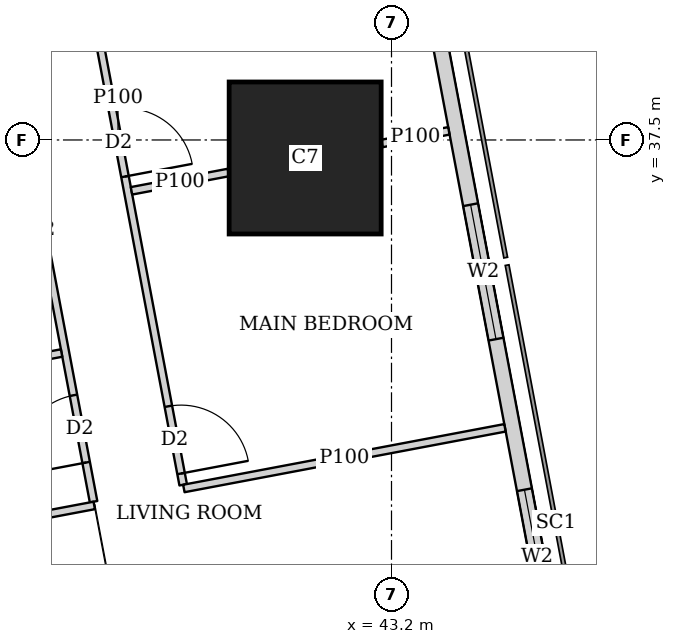
"""IFC4 building model, lengths in metres.
Left out: names, types, materials, properties, quantities, classifications, styles, units other than length and angle.
Written with IfcOpenShell. Run it as: python <this file> out.ifc"""

import sys

from ifc_helpers import new_model, si_unit, direction, frame, frame_2d, origin, origin_2d, place, context, subcontext, project, spatial, rectangle, extrude, element, fill, save


model = new_model("IFC4")
c1 = context("Model", 3, precision=1e-05, world=origin(), true_north=direction((0.0, 1.0)))
c2 = subcontext(c1, "Body", "Model", "MODEL_VIEW")
j1 = project(units=[si_unit("LENGTHUNIT", "METRE"), si_unit("PLANEANGLEUNIT", "RADIAN")], contexts=[c1])
p1 = place(None, origin())
s1 = spatial("IfcSite", under=j1, at=p1, CompositionType="ELEMENT")
p2 = place(p1, origin())
s2 = spatial("IfcBuilding", under=s1, at=p2, CompositionType="ELEMENT")
p3 = place(p2, frame((0.0, 0.0, 274.1)))
s3 = spatial("IfcBuildingStorey", under=s2, at=p3, CompositionType="ELEMENT", Elevation=274.1)
p4 = place(p3, frame((42.064, 37.263, 0.0), z_axis=(0.0, 0.0, 1.0), x_axis=(1.0, 0.0, 0.0)))
e1 = element("IfcColumn", 1, at=p4, inside=s3, PredefinedType="COLUMN", context=c2, shape_type="SweptSolid", body=[
    extrude(rectangle(XDim=2.0, YDim=2.0, at=origin_2d()), origin(), (0.0, 0.0, 1.0), 3.75),
])
p5 = place(p3, frame((49.684, 7.832, 0.0), z_axis=(0.0, 0.0, 1.0), x_axis=(-0.185616669694, 0.982622232565, 0.0)))
e2 = element("IfcWall", 2, at=p5, inside=s3, PredefinedType="SOLIDWALL", context=c2, shape_type="SweptSolid", body=[
    extrude(rectangle(XDim=36.0, YDim=0.2, at=frame_2d((18.0, 0.0))), origin(), (0.0, 0.0, 1.0), 3.5),
])
p6 = place(p5, frame((2.518, 0.0, 0.9)))
e3 = element("IfcOpeningElement", 3, at=p6, cuts=e2, PredefinedType="OPENING", context=c2, shape_type="SweptSolid", body=[
    extrude(rectangle(XDim=2.4, YDim=1.5, at=frame_2d((1.2, 0.75))), frame((0.0, 0.11, 0.0), z_axis=(0.0, -1.0, 0.0), x_axis=(1.0, 0.0, 0.0)), (0.0, 0.0, 1.0), 0.22),
])
p7 = place(p5, frame((8.444, 0.0, 0.9)))
e4 = element("IfcOpeningElement", 4, at=p7, cuts=e2, PredefinedType="OPENING", context=c2, shape_type="SweptSolid", body=[
    extrude(rectangle(XDim=1.8, YDim=1.5, at=frame_2d((0.9, 0.75))), frame((0.0, 0.11, 0.0), z_axis=(0.0, -1.0, 0.0), x_axis=(1.0, 0.0, 0.0)), (0.0, 0.0, 1.0), 0.22),
])
p8 = place(p5, frame((12.261, 0.0, 0.9)))
e5 = element("IfcOpeningElement", 5, at=p8, cuts=e2, PredefinedType="OPENING", context=c2, shape_type="SweptSolid", body=[
    extrude(rectangle(XDim=1.8, YDim=1.5, at=frame_2d((0.9, 0.75))), frame((0.0, 0.11, 0.0), z_axis=(0.0, -1.0, 0.0), x_axis=(1.0, 0.0, 0.0)), (0.0, 0.0, 1.0), 0.22),
])
p9 = place(p5, frame((16.078, 0.0, 0.9)))
e6 = element("IfcOpeningElement", 6, at=p9, cuts=e2, PredefinedType="OPENING", context=c2, shape_type="SweptSolid", body=[
    extrude(rectangle(XDim=1.8, YDim=1.5, at=frame_2d((0.9, 0.75))), frame((0.0, 0.11, 0.0), z_axis=(0.0, -1.0, 0.0), x_axis=(1.0, 0.0, 0.0)), (0.0, 0.0, 1.0), 0.22),
])
p10 = place(p5, frame((19.894, 0.0, 0.9)))
e7 = element("IfcOpeningElement", 7, at=p10, cuts=e2, PredefinedType="OPENING", context=c2, shape_type="SweptSolid", body=[
    extrude(rectangle(XDim=1.8, YDim=1.5, at=frame_2d((0.9, 0.75))), frame((0.0, 0.11, 0.0), z_axis=(0.0, -1.0, 0.0), x_axis=(1.0, 0.0, 0.0)), (0.0, 0.0, 1.0), 0.22),
])
p11 = place(p5, frame((23.71, 0.0, 0.9)))
e8 = element("IfcOpeningElement", 8, at=p11, cuts=e2, PredefinedType="OPENING", context=c2, shape_type="SweptSolid", body=[
    extrude(rectangle(XDim=1.8, YDim=1.5, at=frame_2d((0.9, 0.75))), frame((0.0, 0.11, 0.0), z_axis=(0.0, -1.0, 0.0), x_axis=(1.0, 0.0, 0.0)), (0.0, 0.0, 1.0), 0.22),
])
p12 = place(p5, frame((27.526, 0.0, 0.9)))
e9 = element("IfcOpeningElement", 9, at=p12, cuts=e2, PredefinedType="OPENING", context=c2, shape_type="SweptSolid", body=[
    extrude(rectangle(XDim=1.8, YDim=1.5, at=frame_2d((0.9, 0.75))), frame((0.0, 0.11, 0.0), z_axis=(0.0, -1.0, 0.0), x_axis=(1.0, 0.0, 0.0)), (0.0, 0.0, 1.0), 0.22),
])
p13 = place(p5, frame((32.046, 0.0, 0.9)))
e10 = element("IfcOpeningElement", 10, at=p13, cuts=e2, PredefinedType="OPENING", context=c2, shape_type="SweptSolid", body=[
    extrude(rectangle(XDim=1.8, YDim=1.5, at=frame_2d((0.9, 0.75))), frame((0.0, 0.11, 0.0), z_axis=(0.0, -1.0, 0.0), x_axis=(1.0, 0.0, 0.0)), (0.0, 0.0, 1.0), 0.22),
])
p14 = place(p3, frame((33.781, 42.186, 0.0), z_axis=(0.0, 0.0, 1.0), x_axis=(0.185593518645, -0.9826266055, 0.0)))
e11 = element("IfcWall", 11, at=p14, inside=s3, PredefinedType="SOLIDWALL", context=c2, shape_type="SweptSolid", body=[
    extrude(rectangle(XDim=35.961, YDim=0.15, at=frame_2d((17.98, 0.0))), origin(), (0.0, 0.0, 1.0), 2.5),
])
p15 = place(p14, frame((11.76, 0.0, 0.0)))
e12 = element("IfcOpeningElement", 12, at=p15, cuts=e11, PredefinedType="OPENING", context=c2, shape_type="SweptSolid", body=[
    extrude(rectangle(XDim=1.0, YDim=2.1, at=frame_2d((0.5, 1.05))), frame((0.0, 0.085, 0.0), z_axis=(0.0, -1.0, 0.0), x_axis=(1.0, 0.0, 0.0)), (0.0, 0.0, 1.0), 0.17),
])
p16 = place(p14, frame((15.576, 0.0, 0.0)))
e13 = element("IfcOpeningElement", 13, at=p16, cuts=e11, PredefinedType="OPENING", context=c2, shape_type="SweptSolid", body=[
    extrude(rectangle(XDim=1.0, YDim=2.1, at=frame_2d((0.5, 1.05))), frame((0.0, 0.085, 0.0), z_axis=(0.0, -1.0, 0.0), x_axis=(1.0, 0.0, 0.0)), (0.0, 0.0, 1.0), 0.17),
])
p17 = place(p14, frame((30.502, 0.0, 0.0)))
e14 = element("IfcOpeningElement", 14, at=p17, cuts=e11, PredefinedType="OPENING", context=c2, shape_type="SweptSolid", body=[
    extrude(rectangle(XDim=1.0, YDim=2.1, at=frame_2d((0.5, 1.05))), frame((0.0, 0.085, 0.0), z_axis=(0.0, -1.0, 0.0), x_axis=(1.0, 0.0, 0.0)), (0.0, 0.0, 1.0), 0.17),
])
p18 = place(p3, frame((38.744, 42.045, 0.0), z_axis=(0.0, 0.0, 1.0), x_axis=(0.185588352162, -0.982627581305, 0.0)))
e15 = element("IfcWall", 15, at=p18, inside=s3, PredefinedType="PARTITIONING", context=c2, shape_type="SweptSolid", body=[
    extrude(rectangle(XDim=9.241, YDim=0.1, at=frame_2d((4.621, 0.0))), origin(), (0.0, 0.0, 1.0), 3.5),
])
p19 = place(p18, frame((8.191, 0.0, 0.0)))
e16 = element("IfcOpeningElement", 16, at=p19, cuts=e15, PredefinedType="OPENING", context=c2, shape_type="SweptSolid", body=[
    extrude(rectangle(XDim=0.9, YDim=2.1, at=frame_2d((0.45, 1.05))), frame((0.0, 0.06, 0.0), z_axis=(0.0, -1.0, 0.0), x_axis=(1.0, 0.0, 0.0)), (0.0, 0.0, 1.0), 0.12),
])
p20 = place(p18, frame((4.215, 0.0, 0.0)))
e17 = element("IfcOpeningElement", 17, at=p20, cuts=e15, PredefinedType="OPENING", context=c2, shape_type="SweptSolid", body=[
    extrude(rectangle(XDim=0.9, YDim=2.1, at=frame_2d((0.45, 1.05))), frame((0.0, 0.06, 0.0), z_axis=(0.0, -1.0, 0.0), x_axis=(1.0, 0.0, 0.0)), (0.0, 0.0, 1.0), 0.12),
])
p21 = place(p3, frame((37.51, 42.109, 0.0), z_axis=(0.0, 0.0, 1.0), x_axis=(0.185659798122, -0.982614084654, 0.0)))
e18 = element("IfcWall", 18, at=p21, inside=s3, PredefinedType="PARTITIONING", context=c2, shape_type="SweptSolid", body=[
    extrude(rectangle(XDim=9.534, YDim=0.1, at=frame_2d((4.767, 0.0))), origin(), (0.0, 0.0, 1.0), 3.5),
])
p22 = place(p21, frame((8.109, 0.0, 0.0)))
e19 = element("IfcOpeningElement", 19, at=p22, cuts=e18, PredefinedType="OPENING", context=c2, shape_type="SweptSolid", body=[
    extrude(rectangle(XDim=0.9, YDim=2.1, at=frame_2d((0.45, 1.05))), frame((0.0, 0.06, 0.0), z_axis=(0.0, -1.0, 0.0), x_axis=(1.0, 0.0, 0.0)), (0.0, 0.0, 1.0), 0.12),
])
p23 = place(p21, frame((2.65, 0.0, 0.0)))
e20 = element("IfcOpeningElement", 20, at=p23, cuts=e18, PredefinedType="OPENING", context=c2, shape_type="SweptSolid", body=[
    extrude(rectangle(XDim=0.9, YDim=2.1, at=frame_2d((0.45, 1.05))), frame((0.0, 0.06, 0.0), z_axis=(0.0, -1.0, 0.0), x_axis=(1.0, 0.0, 0.0)), (0.0, 0.0, 1.0), 0.12),
])
p24 = place(p21, frame((5.44, 0.0, 0.0)))
e21 = element("IfcOpeningElement", 21, at=p24, cuts=e18, PredefinedType="OPENING", context=c2, shape_type="SweptSolid", body=[
    extrude(rectangle(XDim=0.9, YDim=2.1, at=frame_2d((0.45, 1.05))), frame((0.0, 0.06, 0.0), z_axis=(0.0, -1.0, 0.0), x_axis=(1.0, 0.0, 0.0)), (0.0, 0.0, 1.0), 0.12),
])
p25 = place(p3, frame((43.955, 37.62, 0.0), z_axis=(0.0, 0.0, 1.0), x_axis=(-0.982708424405, -0.18515980288, 0.0)))
e22 = element("IfcWall", 22, at=p25, inside=s3, PredefinedType="PARTITIONING", context=c2, shape_type="SweptSolid", body=[
    extrude(rectangle(XDim=0.897, YDim=0.1, at=frame_2d((0.448, 0.0))), origin(), (0.0, 0.0, 1.0), 3.5),
])
p26 = place(p3, frame((41.054, 37.072, 0.0), z_axis=(0.0, 0.0, 1.0), x_axis=(-0.982602741717, -0.185719821156, 0.0)))
e23 = element("IfcWall", 23, at=p26, inside=s3, PredefinedType="PARTITIONING", context=c2, shape_type="SweptSolid", body=[
    extrude(rectangle(XDim=1.297, YDim=0.1, at=frame_2d((0.649, 0.0))), origin(), (0.0, 0.0, 1.0), 3.5),
])
p27 = place(p3, frame((44.693, 33.713, 0.0), z_axis=(0.0, 0.0, 1.0), x_axis=(-0.982633535512, -0.185556823879, 0.0)))
e24 = element("IfcWall", 24, at=p27, inside=s3, PredefinedType="PARTITIONING", context=c2, shape_type="SweptSolid", body=[
    extrude(rectangle(XDim=4.3, YDim=0.1, at=frame_2d((2.15, 0.0))), origin(), (0.0, 0.0, 1.0), 2.5),
])
p28 = place(p3, frame((39.289, 32.692, 0.0), z_axis=(0.0, 0.0, 1.0), x_axis=(-0.982662827464, -0.185401638399, 0.0)))
e25 = element("IfcWall", 25, at=p28, inside=s3, PredefinedType="PARTITIONING", context=c2, shape_type="SweptSolid", body=[
    extrude(rectangle(XDim=3.575, YDim=0.1, at=frame_2d((1.788, 0.0))), origin(), (0.0, 0.0, 1.0), 3.5),
])
p29 = place(p3, frame((38.859, 34.697, 0.0), z_axis=(0.0, 0.0, 1.0), x_axis=(-0.982626628545, -0.185593396635, 0.0)))
e26 = element("IfcWall", 26, at=p29, inside=s3, PredefinedType="PARTITIONING", context=c2, shape_type="SweptSolid", body=[
    extrude(rectangle(XDim=3.524, YDim=0.1, at=frame_2d((1.762, 0.0))), origin(), (0.0, 0.0, 1.0), 3.5),
])
p30 = place(p11, origin())
e27 = element("IfcWindow", 27, at=p30, inside=s3, PartitioningType="SINGLE_PANEL", PredefinedType="WINDOW", context=c2, shape_type="SweptSolid", body=[
    extrude(rectangle(XDim=1.8, YDim=1.5, at=frame_2d((0.9, 0.75))), frame((0.0, 0.03, 0.0), z_axis=(0.0, -1.0, 0.0), x_axis=(1.0, 0.0, 0.0)), (0.0, 0.0, 1.0), 0.06),
])
fill(e8, e27)
p31 = place(p12, origin())
e28 = element("IfcWindow", 28, at=p31, inside=s3, PartitioningType="SINGLE_PANEL", PredefinedType="WINDOW", context=c2, shape_type="SweptSolid", body=[
    extrude(rectangle(XDim=1.8, YDim=1.5, at=frame_2d((0.9, 0.75))), frame((0.0, 0.03, 0.0), z_axis=(0.0, -1.0, 0.0), x_axis=(1.0, 0.0, 0.0)), (0.0, 0.0, 1.0), 0.06),
])
fill(e9, e28)
p32 = place(p19, origin())
e29 = element("IfcDoor", 29, at=p32, inside=s3, OperationType="SINGLE_SWING_RIGHT", PredefinedType="DOOR", context=c2, shape_type="SweptSolid", body=[
    extrude(rectangle(XDim=0.9, YDim=2.1, at=frame_2d((0.45, 1.05))), frame((0.0, 0.025, 0.0), z_axis=(0.0, -1.0, 0.0), x_axis=(1.0, 0.0, 0.0)), (0.0, 0.0, 1.0), 0.05),
])
fill(e16, e29)
p33 = place(p20, origin())
e30 = element("IfcDoor", 30, at=p33, inside=s3, OperationType="SINGLE_SWING_RIGHT", PredefinedType="DOOR", context=c2, shape_type="SweptSolid", body=[
    extrude(rectangle(XDim=0.9, YDim=2.1, at=frame_2d((0.45, 1.05))), frame((0.0, 0.025, 0.0), z_axis=(0.0, -1.0, 0.0), x_axis=(1.0, 0.0, 0.0)), (0.0, 0.0, 1.0), 0.05),
])
fill(e17, e30)
p34 = place(p22, origin())
e31 = element("IfcDoor", 31, at=p34, inside=s3, OperationType="SINGLE_SWING_LEFT", PredefinedType="DOOR", context=c2, shape_type="SweptSolid", body=[
    extrude(rectangle(XDim=0.9, YDim=2.1, at=frame_2d((0.45, 1.05))), frame((0.0, 0.025, 0.0), z_axis=(0.0, -1.0, 0.0), x_axis=(1.0, 0.0, 0.0)), (0.0, 0.0, 1.0), 0.05),
])
fill(e19, e31)
save(model, sys.argv[1])
